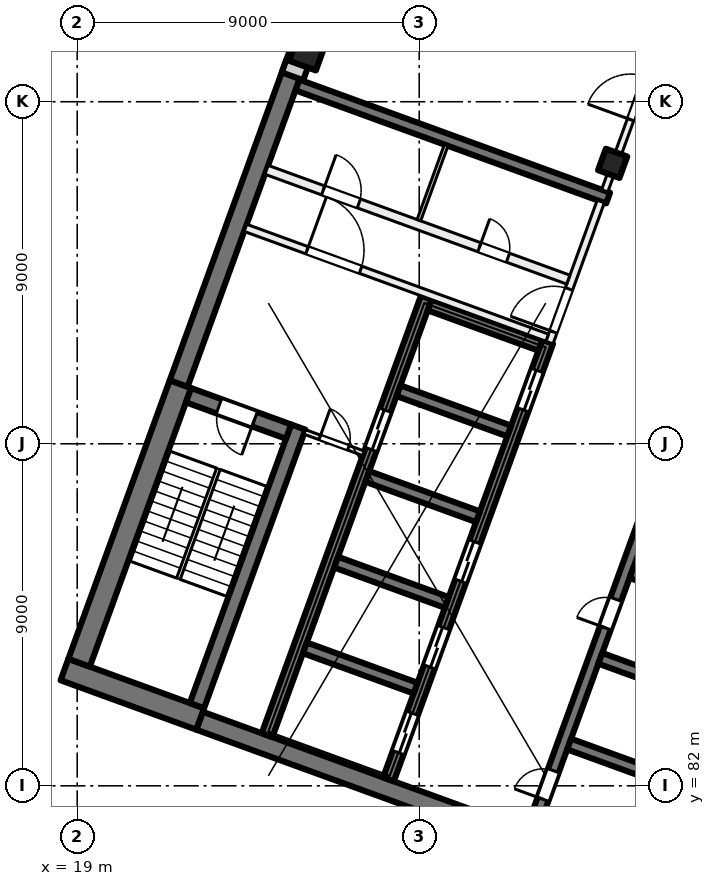
"""IFC4 building model, lengths in metres.
Left out: names, types, materials, properties, quantities, classifications, styles, units other than length and angle.
Written with IfcOpenShell. Run it as: python <this file> out.ifc"""

import sys

from ifc_helpers import new_model, si_unit, direction, frame, frame_2d, origin, origin_2d, place, context, subcontext, project, spatial, rectangle, extrude, element, fill, save


model = new_model("IFC4")
c1 = context("Model", 3, precision=1e-05, world=origin(), true_north=direction((0.0, 1.0)))
c2 = subcontext(c1, "Body", "Model", "MODEL_VIEW")
j1 = project(units=[si_unit("LENGTHUNIT", "METRE"), si_unit("PLANEANGLEUNIT", "RADIAN")], contexts=[c1])
p1 = place(None, origin())
s1 = spatial("IfcSite", under=j1, at=p1, CompositionType="ELEMENT")
p2 = place(p1, origin())
s2 = spatial("IfcBuilding", under=s1, at=p2, CompositionType="ELEMENT")
p3 = place(p2, frame((0.0, 0.0, 204.0)))
s3 = spatial("IfcBuildingStorey", under=s2, at=p3, CompositionType="ELEMENT", Elevation=204.0)
p4 = place(p3, frame((33.091, 98.379, 0.0), z_axis=(0.0, 0.0, 1.0), x_axis=(-0.342020143326, -0.939692620786, 0.0)))
e1 = element("IfcColumn", 1, at=p4, inside=s3, PredefinedType="COLUMN", context=c2, shape_type="SweptSolid", body=[
    extrude(rectangle(XDim=0.6, YDim=0.6, at=origin_2d()), origin(), (0.0, 0.0, 1.0), 4.0),
])
p5 = place(p3, frame((25.056, 101.303, 0.0), z_axis=(0.0, 0.0, 1.0), x_axis=(-0.342020143326, -0.939692620786, 0.0)))
e2 = element("IfcColumn", 2, at=p5, inside=s3, PredefinedType="COLUMN", context=c2, shape_type="SweptSolid", body=[
    extrude(rectangle(XDim=0.75, YDim=0.75, at=origin_2d()), origin(), (0.0, 0.0, 1.0), 4.0),
])
p6 = place(p3, frame((35.75, 78.788, 0.0), z_axis=(0.0, 0.0, 1.0), x_axis=(-0.939692894512, 0.342019391267, 0.0)))
e3 = element("IfcWall", 3, at=p6, inside=s3, PredefinedType="SHEAR", context=c2, shape_type="SweptSolid", body=[
    extrude(rectangle(XDim=14.4, YDim=0.5, at=frame_2d((7.2, 0.0))), origin(), (0.0, 0.0, 1.0), 4.0),
])
p7 = place(p3, frame((22.236, 83.76, 0.0), z_axis=(0.0, 0.0, 1.0), x_axis=(-0.939680822529, 0.342052557032, 0.0)))
e4 = element("IfcWall", 4, at=p7, inside=s3, PredefinedType="SHEAR", context=c2, shape_type="SweptSolid", body=[
    extrude(rectangle(XDim=3.8, YDim=0.6, at=frame_2d((1.9, 0.0))), origin(), (0.0, 0.0, 1.0), 4.0),
])
p8 = place(p3, frame((19.05, 85.239, 0.0), z_axis=(0.0, 0.0, 1.0), x_axis=(0.342016982193, 0.939693771338, 0.0)))
e5 = element("IfcWall", 5, at=p8, inside=s3, PredefinedType="SHEAR", context=c2, shape_type="SweptSolid", body=[
    extrude(rectangle(XDim=7.8, YDim=0.6, at=frame_2d((3.9, 0.0))), origin(), (0.0, 0.0, 1.0), 4.0),
])
p9 = place(p3, frame((21.67, 92.585, 0.0), z_axis=(0.0, 0.0, 1.0), x_axis=(0.342035714298, 0.93968695327, 0.0)))
e6 = element("IfcWall", 6, at=p9, inside=s3, PredefinedType="SHEAR", context=c2, shape_type="SweptSolid", body=[
    extrude(rectangle(XDim=8.975, YDim=0.5, at=frame_2d((4.488, 0.0))), origin(), (0.0, 0.0, 1.0), 4.0),
])
p10 = place(p3, frame((22.15, 84.11, 0.0), z_axis=(0.0, 0.0, 1.0), x_axis=(0.342016982193, 0.939693771338, 0.0)))
e7 = element("IfcWall", 7, at=p10, inside=s3, PredefinedType="SHEAR", context=c2, shape_type="SweptSolid", body=[
    extrude(rectangle(XDim=7.8, YDim=0.4, at=frame_2d((3.9, 0.0))), origin(), (0.0, 0.0, 1.0), 4.0),
])
p11 = place(p3, frame((24.562, 91.32, 0.0), z_axis=(0.0, 0.0, 1.0), x_axis=(-0.939717030584, 0.341953070509, 0.0)))
e8 = element("IfcWall", 8, at=p11, inside=s3, PredefinedType="SHEAR", context=c2, shape_type="SweptSolid", body=[
    extrude(rectangle(XDim=2.8, YDim=0.4, at=frame_2d((1.4, 0.0))), origin(), (0.0, 0.0, 1.0), 4.0),
])
p12 = place(p11, frame((0.95, 0.0, 0.0)))
e9 = element("IfcOpeningElement", 9, at=p12, cuts=e8, PredefinedType="OPENING", context=c2, shape_type="SweptSolid", body=[
    extrude(rectangle(XDim=1.0, YDim=2.1, at=frame_2d((0.5, 1.05))), frame((0.0, 0.21, 0.0), z_axis=(0.0, -1.0, 0.0), x_axis=(1.0, 0.0, 0.0)), (0.0, 0.0, 1.0), 0.42),
])
p13 = place(p3, frame((30.949, 80.801, 0.0), z_axis=(0.0, 0.0, 1.0), x_axis=(0.342016684409, 0.939693879721, 0.0)))
e10 = element("IfcWall", 10, at=p13, inside=s3, PredefinedType="SHEAR", context=c2, shape_type="SweptSolid", body=[
    extrude(rectangle(XDim=12.25, YDim=0.3, at=frame_2d((6.125, 0.0))), origin(), (0.0, 0.0, 1.0), 4.0),
])
p14 = place(p13, frame((0.9, 0.0, 0.0)))
e11 = element("IfcOpeningElement", 11, at=p14, cuts=e10, PredefinedType="OPENING", context=c2, shape_type="SweptSolid", body=[
    extrude(rectangle(XDim=0.8, YDim=2.1, at=frame_2d((0.4, 1.05))), frame((0.0, 0.16, 0.0), z_axis=(0.0, -1.0, 0.0), x_axis=(1.0, 0.0, 0.0)), (0.0, 0.0, 1.0), 0.32),
])
p15 = place(p13, frame((5.7, 0.0, 0.0)))
e12 = element("IfcOpeningElement", 12, at=p15, cuts=e10, PredefinedType="OPENING", context=c2, shape_type="SweptSolid", body=[
    extrude(rectangle(XDim=0.8, YDim=2.1, at=frame_2d((0.4, 1.05))), frame((0.0, 0.16, 0.0), z_axis=(0.0, -1.0, 0.0), x_axis=(1.0, 0.0, 0.0)), (0.0, 0.0, 1.0), 0.32),
])
p16 = place(p3, frame((34.858, 82.039, 0.0), z_axis=(0.0, 0.0, 1.0), x_axis=(-0.939689908313, 0.342027595692, 0.0)))
e13 = element("IfcWall", 13, at=p16, inside=s3, PredefinedType="SHEAR", context=c2, shape_type="SweptSolid", body=[
    extrude(rectangle(XDim=3.1, YDim=0.3, at=frame_2d((1.55, 0.0))), origin(), (0.0, 0.0, 1.0), 4.0),
])
p17 = place(p3, frame((35.679, 84.294, 0.0), z_axis=(0.0, 0.0, 1.0), x_axis=(-0.939706007505, 0.341983361377, 0.0)))
e14 = element("IfcWall", 14, at=p17, inside=s3, PredefinedType="SHEAR", context=c2, shape_type="SweptSolid", body=[
    extrude(rectangle(XDim=3.1, YDim=0.3, at=frame_2d((1.55, 0.0))), origin(), (0.0, 0.0, 1.0), 4.0),
])
p18 = place(p3, frame((36.5, 86.549, 0.0), z_axis=(0.0, 0.0, 1.0), x_axis=(-0.939689908313, 0.342027595692, 0.0)))
e15 = element("IfcWall", 15, at=p18, inside=s3, PredefinedType="SHEAR", context=c2, shape_type="SweptSolid", body=[
    extrude(rectangle(XDim=3.1, YDim=0.3, at=frame_2d((1.55, 0.0))), origin(), (0.0, 0.0, 1.0), 4.0),
])
p19 = place(p3, frame((27.191, 82.169, 0.0), z_axis=(0.0, 0.0, 1.0), x_axis=(0.342016684409, 0.939693879721, 0.0)))
e16 = element("IfcWall", 16, at=p19, inside=s3, PredefinedType="SHEAR", context=c2, shape_type="SweptSolid", body=[
    extrude(rectangle(XDim=12.25, YDim=0.3, at=frame_2d((6.125, 0.0))), origin(), (0.0, 0.0, 1.0), 4.0),
])
p20 = place(p19, frame((0.75, 0.0, 0.0)))
e17 = element("IfcOpeningElement", 17, at=p20, cuts=e16, PredefinedType="OPENING", context=c2, shape_type="SweptSolid", body=[
    extrude(rectangle(XDim=1.1, YDim=2.1, at=frame_2d((0.55, 1.05))), frame((0.0, 0.16, 0.0), z_axis=(0.0, -1.0, 0.0), x_axis=(1.0, 0.0, 0.0)), (0.0, 0.0, 1.0), 0.32),
])
p21 = place(p19, frame((3.15, 0.0, 0.0)))
e18 = element("IfcOpeningElement", 18, at=p21, cuts=e16, PredefinedType="OPENING", context=c2, shape_type="SweptSolid", body=[
    extrude(rectangle(XDim=1.1, YDim=2.1, at=frame_2d((0.55, 1.05))), frame((0.0, 0.16, 0.0), z_axis=(0.0, -1.0, 0.0), x_axis=(1.0, 0.0, 0.0)), (0.0, 0.0, 1.0), 0.32),
])
p22 = place(p19, frame((5.55, 0.0, 0.0)))
e19 = element("IfcOpeningElement", 19, at=p22, cuts=e16, PredefinedType="OPENING", context=c2, shape_type="SweptSolid", body=[
    extrude(rectangle(XDim=1.1, YDim=2.1, at=frame_2d((0.55, 1.05))), frame((0.0, 0.16, 0.0), z_axis=(0.0, -1.0, 0.0), x_axis=(1.0, 0.0, 0.0)), (0.0, 0.0, 1.0), 0.32),
])
p23 = place(p19, frame((10.35, 0.0, 0.0)))
e20 = element("IfcOpeningElement", 20, at=p23, cuts=e16, PredefinedType="OPENING", context=c2, shape_type="SweptSolid", body=[
    extrude(rectangle(XDim=1.1, YDim=2.1, at=frame_2d((0.55, 1.05))), frame((0.0, 0.16, 0.0), z_axis=(0.0, -1.0, 0.0), x_axis=(1.0, 0.0, 0.0)), (0.0, 0.0, 1.0), 0.32),
])
p24 = place(p3, frame((23.996, 83.332, 0.0), z_axis=(0.0, 0.0, 1.0), x_axis=(0.342016684409, 0.939693879721, 0.0)))
e21 = element("IfcWall", 21, at=p24, inside=s3, PredefinedType="SHEAR", context=c2, shape_type="SweptSolid", body=[
    extrude(rectangle(XDim=12.25, YDim=0.3, at=frame_2d((6.125, 0.0))), origin(), (0.0, 0.0, 1.0), 4.0),
])
p25 = place(p24, frame((8.0, 0.0, 0.0)))
e22 = element("IfcOpeningElement", 22, at=p25, cuts=e21, PredefinedType="OPENING", context=c2, shape_type="SweptSolid", body=[
    extrude(rectangle(XDim=1.1, YDim=2.1, at=frame_2d((0.55, 1.05))), frame((0.0, 0.16, 0.0), z_axis=(0.0, -1.0, 0.0), x_axis=(1.0, 0.0, 0.0)), (0.0, 0.0, 1.0), 0.32),
])
for number, where, z_axis, x_axis in (
    (23, (27.905, 84.57, 0.0), (0.0, 0.0, 1.0), (-0.94, 0.342, 0.0)),
    (24, (28.726, 86.825, 0.0), (0.0, 0.0, 1.0), (-0.94, 0.342, 0.0)),
    (25, (29.546, 89.08, 0.0), (0.0, 0.0, 1.0), (-0.94, 0.342, 0.0)),
):
    element("IfcWall", number, at=place(p3, frame(where, z_axis=z_axis, x_axis=x_axis)), inside=s3, PredefinedType="SHEAR", context=c2, shape_type="SweptSolid", body=[
        extrude(rectangle(XDim=3.1, YDim=0.3, at=frame_2d((1.55, 0.0))), origin(), (0.0, 0.0, 1.0), 4.0),
    ])
for number, where, z_axis, x_axis in (
    (26, (30.367, 91.336, 0.0), (0.0, 0.0, 1.0), (-0.94, 0.342, 0.0)),
    (27, (31.188, 93.591, 0.0), (0.0, 0.0, 1.0), (-0.94, 0.342, 0.0)),
):
    element("IfcWall", number, at=place(p3, frame(where, z_axis=z_axis, x_axis=x_axis)), inside=s3, PredefinedType="SHEAR", context=c2, shape_type="SweptSolid", body=[
        extrude(rectangle(XDim=3.1, YDim=0.3, at=frame_2d((1.55, 0.0))), origin(), (0.0, 0.0, 1.0), 4.0),
    ])
p26 = place(p3, frame((32.971, 97.465, 0.0), z_axis=(0.0, 0.0, 1.0), x_axis=(-0.939695066972, 0.34201342241, 0.0)))
e28 = element("IfcWall", 28, at=p26, inside=s3, PredefinedType="SHEAR", context=c2, shape_type="SweptSolid", body=[
    extrude(rectangle(XDim=8.7, YDim=0.3, at=frame_2d((4.35, 0.0))), origin(), (0.0, 0.0, 1.0), 4.0),
])
p27 = place(p3, frame((24.666, 100.669, 0.0), z_axis=(0.0, 0.0, 1.0), x_axis=(0.34201964167, 0.939692803373, 0.0)))
e29 = element("IfcWall", 29, at=p27, inside=s3, PredefinedType="SOLIDWALL", context=c2, shape_type="SweptSolid", body=[
    extrude(rectangle(XDim=32.884, YDim=0.6, at=frame_2d((16.442, 0.0))), origin(), (0.0, 0.0, 1.0), 3.625),
])
p28 = place(p27, frame((1.48, 0.0, 0.9)))
e30 = element("IfcOpeningElement", 30, at=p28, cuts=e29, PredefinedType="OPENING", context=c2, shape_type="SweptSolid", body=[
    extrude(rectangle(XDim=3.0, YDim=2.4, at=frame_2d((1.5, 1.2))), frame((0.0, 0.31, 0.0), z_axis=(0.0, -1.0, 0.0), x_axis=(1.0, 0.0, 0.0)), (0.0, 0.0, 1.0), 0.62),
])
p29 = place(p27, frame((5.98, 0.0, 0.9)))
e31 = element("IfcOpeningElement", 31, at=p29, cuts=e29, PredefinedType="OPENING", context=c2, shape_type="SweptSolid", body=[
    extrude(rectangle(XDim=3.0, YDim=2.4, at=frame_2d((1.5, 1.2))), frame((0.0, 0.31, 0.0), z_axis=(0.0, -1.0, 0.0), x_axis=(1.0, 0.0, 0.0)), (0.0, 0.0, 1.0), 0.62),
])
p30 = place(p27, frame((10.48, 0.0, 0.9)))
e32 = element("IfcOpeningElement", 32, at=p30, cuts=e29, PredefinedType="OPENING", context=c2, shape_type="SweptSolid", body=[
    extrude(rectangle(XDim=3.0, YDim=2.4, at=frame_2d((1.5, 1.2))), frame((0.0, 0.31, 0.0), z_axis=(0.0, -1.0, 0.0), x_axis=(1.0, 0.0, 0.0)), (0.0, 0.0, 1.0), 0.62),
])
p31 = place(p27, frame((15.58, 0.0, 0.0)))
e33 = element("IfcOpeningElement", 33, at=p31, cuts=e29, PredefinedType="OPENING", context=c2, shape_type="SweptSolid", body=[
    extrude(rectangle(XDim=1.8, YDim=2.4, at=frame_2d((0.9, 1.2))), frame((0.0, 0.31, 0.0), z_axis=(0.0, -1.0, 0.0), x_axis=(1.0, 0.0, 0.0)), (0.0, 0.0, 1.0), 0.62),
])
p32 = place(p27, frame((19.48, 0.0, 0.9)))
e34 = element("IfcOpeningElement", 34, at=p32, cuts=e29, PredefinedType="OPENING", context=c2, shape_type="SweptSolid", body=[
    extrude(rectangle(XDim=3.0, YDim=2.4, at=frame_2d((1.5, 1.2))), frame((0.0, 0.31, 0.0), z_axis=(0.0, -1.0, 0.0), x_axis=(1.0, 0.0, 0.0)), (0.0, 0.0, 1.0), 0.62),
])
p33 = place(p27, frame((23.98, 0.0, 0.9)))
e35 = element("IfcOpeningElement", 35, at=p33, cuts=e29, PredefinedType="OPENING", context=c2, shape_type="SweptSolid", body=[
    extrude(rectangle(XDim=3.0, YDim=2.4, at=frame_2d((1.5, 1.2))), frame((0.0, 0.31, 0.0), z_axis=(0.0, -1.0, 0.0), x_axis=(1.0, 0.0, 0.0)), (0.0, 0.0, 1.0), 0.62),
])
p34 = place(p27, frame((29.08, 0.0, 0.0)))
e36 = element("IfcOpeningElement", 36, at=p34, cuts=e29, PredefinedType="OPENING", context=c2, shape_type="SweptSolid", body=[
    extrude(rectangle(XDim=1.8, YDim=2.4, at=frame_2d((0.9, 1.2))), frame((0.0, 0.31, 0.0), z_axis=(0.0, -1.0, 0.0), x_axis=(1.0, 0.0, 0.0)), (0.0, 0.0, 1.0), 0.62),
])
p35 = place(p3, frame((31.427, 93.663, 0.0), z_axis=(0.0, 0.0, 1.0), x_axis=(0.342030870568, 0.93968871632, 0.0)))
e37 = element("IfcWall", 37, at=p35, inside=s3, PredefinedType="PARTITIONING", context=c2, shape_type="SweptSolid", body=[
    extrude(rectangle(XDim=3.95, YDim=0.2, at=frame_2d((1.975, 0.0))), origin(), (0.0, 0.0, 1.0), 3.625),
])
p36 = place(p35, frame((0.3, 0.0, 0.0)))
e38 = element("IfcOpeningElement", 38, at=p36, cuts=e37, PredefinedType="OPENING", context=c2, shape_type="SweptSolid", body=[
    extrude(rectangle(XDim=1.2, YDim=2.1, at=frame_2d((0.6, 1.05))), frame((0.0, 0.11, 0.0), z_axis=(0.0, -1.0, 0.0), x_axis=(1.0, 0.0, 0.0)), (0.0, 0.0, 1.0), 0.22),
])
p37 = place(p3, frame((23.427, 96.682, 0.0), z_axis=(0.0, 0.0, 1.0), x_axis=(0.939690465531, -0.342026064782, 0.0)))
e39 = element("IfcWall", 39, at=p37, inside=s3, PredefinedType="PARTITIONING", context=c2, shape_type="SweptSolid", body=[
    extrude(rectangle(XDim=8.45, YDim=0.2, at=frame_2d((4.225, 0.0))), origin(), (0.0, 0.0, 1.0), 3.625),
])
p38 = place(p37, frame((1.725, 0.0, 0.0)))
e40 = element("IfcOpeningElement", 40, at=p38, cuts=e39, PredefinedType="OPENING", context=c2, shape_type="SweptSolid", body=[
    extrude(rectangle(XDim=1.5, YDim=2.1, at=frame_2d((0.75, 1.05))), frame((0.0, 0.11, 0.0), z_axis=(0.0, -1.0, 0.0), x_axis=(1.0, 0.0, 0.0)), (0.0, 0.0, 1.0), 0.22),
])
p39 = place(p3, frame((23.983, 98.208, 0.0), z_axis=(0.0, 0.0, 1.0), x_axis=(0.939699751196, -0.342000552051, 0.0)))
e41 = element("IfcWall", 41, at=p39, inside=s3, PredefinedType="PARTITIONING", context=c2, shape_type="SweptSolid", body=[
    extrude(rectangle(XDim=8.45, YDim=0.25, at=frame_2d((4.225, 0.0))), origin(), (0.0, 0.0, 1.0), 3.625),
])
p40 = place(p39, frame((5.96, 0.0, 0.0)))
e42 = element("IfcOpeningElement", 42, at=p40, cuts=e41, PredefinedType="OPENING", context=c2, shape_type="SweptSolid", body=[
    extrude(rectangle(XDim=0.8, YDim=2.1, at=frame_2d((0.4, 1.05))), frame((0.0, 0.135, 0.0), z_axis=(0.0, -1.0, 0.0), x_axis=(1.0, 0.0, 0.0)), (0.0, 0.0, 1.0), 0.27),
])
p41 = place(p39, frame((1.585, 0.0, 0.0)))
e43 = element("IfcOpeningElement", 43, at=p41, cuts=e41, PredefinedType="OPENING", context=c2, shape_type="SweptSolid", body=[
    extrude(rectangle(XDim=1.0, YDim=2.1, at=frame_2d((0.5, 1.05))), frame((0.0, 0.135, 0.0), z_axis=(0.0, -1.0, 0.0), x_axis=(1.0, 0.0, 0.0)), (0.0, 0.0, 1.0), 0.27),
])
p42 = place(p3, frame((24.985, 91.312, 0.0), z_axis=(0.0, 0.0, 1.0), x_axis=(0.939719959755, -0.341945020783, 0.0)))
e44 = element("IfcWall", 44, at=p42, inside=s3, PredefinedType="PARTITIONING", context=c2, shape_type="SweptSolid", body=[
    extrude(rectangle(XDim=1.65, YDim=0.125, at=frame_2d((0.825, 0.0))), origin(), (0.0, 0.0, 1.0), 3.625),
])
p43 = place(p42, frame((0.425, 0.0, 0.0)))
e45 = element("IfcOpeningElement", 45, at=p43, cuts=e44, PredefinedType="OPENING", context=c2, shape_type="SweptSolid", body=[
    extrude(rectangle(XDim=0.8, YDim=2.1, at=frame_2d((0.4, 1.05))), frame((0.0, 0.073, 0.0), z_axis=(0.0, -1.0, 0.0), x_axis=(1.0, 0.0, 0.0)), (0.0, 0.0, 1.0), 0.145),
])
p44 = place(p3, frame((27.991, 96.883, 0.0), z_axis=(0.0, 0.0, 1.0), x_axis=(0.342023078919, 0.939691552312, 0.0)))
e46 = element("IfcWall", 46, at=p44, inside=s3, PredefinedType="PARTITIONING", context=c2, shape_type="SweptSolid", body=[
    extrude(rectangle(XDim=2.1, YDim=0.1, at=frame_2d((1.05, 0.0))), origin(), (0.0, 0.0, 1.0), 3.625),
])
p45 = place(p3, frame((26.736, 105.48, 0.0), z_axis=(0.0, 0.0, 1.0), x_axis=(0.939695108427, -0.342013308511, 0.0)))
e47 = element("IfcWall", 47, at=p45, inside=s3, PredefinedType="PARTITIONING", context=c2, shape_type="SweptSolid", body=[
    extrude(rectangle(XDim=16.9, YDim=0.175, at=frame_2d((8.45, 0.0))), origin(), (0.0, 0.0, 1.0), 3.625),
])
p46 = place(p3, frame((32.881, 97.657, 0.0), z_axis=(0.0, 0.0, 1.0), x_axis=(0.342058204353, 0.939678766832, 0.0)))
e48 = element("IfcWall", 48, at=p46, inside=s3, PredefinedType="PARTITIONING", context=c2, shape_type="SweptSolid", body=[
    extrude(rectangle(XDim=5.163, YDim=0.175, at=frame_2d((2.581, 0.0))), origin(), (0.0, 0.0, 1.0), 3.625),
])
p47 = place(p46, frame((1.991, 0.0, 0.0)))
e49 = element("IfcOpeningElement", 49, at=p47, cuts=e48, PredefinedType="OPENING", context=c2, shape_type="SweptSolid", body=[
    extrude(rectangle(XDim=1.2, YDim=2.1, at=frame_2d((0.6, 1.05))), frame((0.0, 0.097, 0.0), z_axis=(0.0, -1.0, 0.0), x_axis=(1.0, 0.0, 0.0)), (0.0, 0.0, 1.0), 0.195),
])
p48 = place(p20, origin())
e50 = element("IfcDoor", 50, at=p48, inside=s3, OperationType="DOUBLE_DOOR_SLIDING", PredefinedType="DOOR", context=c2, shape_type="SweptSolid", body=[
    extrude(rectangle(XDim=1.1, YDim=2.1, at=frame_2d((0.55, 1.05))), frame((0.0, 0.025, 0.0), z_axis=(0.0, -1.0, 0.0), x_axis=(1.0, 0.0, 0.0)), (0.0, 0.0, 1.0), 0.05),
])
fill(e17, e50)
p49 = place(p21, origin())
e51 = element("IfcDoor", 51, at=p49, inside=s3, OperationType="DOUBLE_DOOR_SLIDING", PredefinedType="DOOR", context=c2, shape_type="SweptSolid", body=[
    extrude(rectangle(XDim=1.1, YDim=2.1, at=frame_2d((0.55, 1.05))), frame((0.0, 0.025, 0.0), z_axis=(0.0, -1.0, 0.0), x_axis=(1.0, 0.0, 0.0)), (0.0, 0.0, 1.0), 0.05),
])
fill(e18, e51)
p50 = place(p22, origin())
e52 = element("IfcDoor", 52, at=p50, inside=s3, OperationType="DOUBLE_DOOR_SLIDING", PredefinedType="DOOR", context=c2, shape_type="SweptSolid", body=[
    extrude(rectangle(XDim=1.1, YDim=2.1, at=frame_2d((0.55, 1.05))), frame((0.0, 0.025, 0.0), z_axis=(0.0, -1.0, 0.0), x_axis=(1.0, 0.0, 0.0)), (0.0, 0.0, 1.0), 0.05),
])
fill(e19, e52)
p51 = place(p23, origin())
e53 = element("IfcDoor", 53, at=p51, inside=s3, OperationType="DOUBLE_DOOR_SLIDING", PredefinedType="DOOR", context=c2, shape_type="SweptSolid", body=[
    extrude(rectangle(XDim=1.1, YDim=2.1, at=frame_2d((0.55, 1.05))), frame((0.0, 0.025, 0.0), z_axis=(0.0, -1.0, 0.0), x_axis=(1.0, 0.0, 0.0)), (0.0, 0.0, 1.0), 0.05),
])
fill(e20, e53)
p52 = place(p14, origin())
e54 = element("IfcDoor", 54, at=p52, inside=s3, OperationType="SINGLE_SWING_LEFT", PredefinedType="DOOR", context=c2, shape_type="SweptSolid", body=[
    extrude(rectangle(XDim=0.8, YDim=2.1, at=frame_2d((0.4, 1.05))), frame((0.0, 0.025, 0.0), z_axis=(0.0, -1.0, 0.0), x_axis=(1.0, 0.0, 0.0)), (0.0, 0.0, 1.0), 0.05),
])
fill(e11, e54)
p53 = place(p15, origin())
e55 = element("IfcDoor", 55, at=p53, inside=s3, OperationType="SINGLE_SWING_RIGHT", PredefinedType="DOOR", context=c2, shape_type="SweptSolid", body=[
    extrude(rectangle(XDim=0.8, YDim=2.1, at=frame_2d((0.4, 1.05))), frame((0.0, 0.025, 0.0), z_axis=(0.0, -1.0, 0.0), x_axis=(1.0, 0.0, 0.0)), (0.0, 0.0, 1.0), 0.05),
])
fill(e12, e55)
p54 = place(p36, origin())
e56 = element("IfcDoor", 56, at=p54, inside=s3, OperationType="DOUBLE_DOOR_SINGLE_SWING", PredefinedType="DOOR", context=c2, shape_type="SweptSolid", body=[
    extrude(rectangle(XDim=1.2, YDim=2.1, at=frame_2d((0.6, 1.05))), frame((0.0, 0.025, 0.0), z_axis=(0.0, -1.0, 0.0), x_axis=(1.0, 0.0, 0.0)), (0.0, 0.0, 1.0), 0.05),
])
fill(e38, e56)
p55 = place(p38, origin())
e57 = element("IfcDoor", 57, at=p55, inside=s3, OperationType="DOUBLE_DOOR_SINGLE_SWING", PredefinedType="DOOR", context=c2, shape_type="SweptSolid", body=[
    extrude(rectangle(XDim=1.5, YDim=2.1, at=frame_2d((0.75, 1.05))), frame((0.0, 0.025, 0.0), z_axis=(0.0, -1.0, 0.0), x_axis=(1.0, 0.0, 0.0)), (0.0, 0.0, 1.0), 0.05),
])
fill(e40, e57)
p56 = place(p12, origin())
e58 = element("IfcDoor", 58, at=p56, inside=s3, OperationType="SINGLE_SWING_LEFT", PredefinedType="DOOR", context=c2, shape_type="SweptSolid", body=[
    extrude(rectangle(XDim=1.0, YDim=2.1, at=frame_2d((0.5, 1.05))), frame((0.0, 0.025, 0.0), z_axis=(0.0, -1.0, 0.0), x_axis=(1.0, 0.0, 0.0)), (0.0, 0.0, 1.0), 0.05),
])
fill(e9, e58)
p57 = place(p43, origin())
e59 = element("IfcDoor", 59, at=p57, inside=s3, OperationType="SINGLE_SWING_RIGHT", PredefinedType="DOOR", context=c2, shape_type="SweptSolid", body=[
    extrude(rectangle(XDim=0.8, YDim=2.1, at=frame_2d((0.4, 1.05))), frame((0.0, 0.025, 0.0), z_axis=(0.0, -1.0, 0.0), x_axis=(1.0, 0.0, 0.0)), (0.0, 0.0, 1.0), 0.05),
])
fill(e45, e59)
p58 = place(p40, origin())
e60 = element("IfcDoor", 60, at=p58, inside=s3, OperationType="SINGLE_SWING_LEFT", PredefinedType="DOOR", context=c2, shape_type="SweptSolid", body=[
    extrude(rectangle(XDim=0.8, YDim=2.1, at=frame_2d((0.4, 1.05))), frame((0.0, 0.025, 0.0), z_axis=(0.0, -1.0, 0.0), x_axis=(1.0, 0.0, 0.0)), (0.0, 0.0, 1.0), 0.05),
])
fill(e42, e60)
p59 = place(p41, origin())
e61 = element("IfcDoor", 61, at=p59, inside=s3, OperationType="SINGLE_SWING_RIGHT", PredefinedType="DOOR", context=c2, shape_type="SweptSolid", body=[
    extrude(rectangle(XDim=1.0, YDim=2.1, at=frame_2d((0.5, 1.05))), frame((0.0, 0.025, 0.0), z_axis=(0.0, -1.0, 0.0), x_axis=(1.0, 0.0, 0.0)), (0.0, 0.0, 1.0), 0.05),
])
fill(e43, e61)
p60 = place(p25, origin())
e62 = element("IfcDoor", 62, at=p60, inside=s3, OperationType="DOUBLE_DOOR_SLIDING", PredefinedType="DOOR", context=c2, shape_type="SweptSolid", body=[
    extrude(rectangle(XDim=1.1, YDim=2.1, at=frame_2d((0.55, 1.05))), frame((0.0, 0.025, 0.0), z_axis=(0.0, -1.0, 0.0), x_axis=(1.0, 0.0, 0.0)), (0.0, 0.0, 1.0), 0.05),
])
fill(e22, e62)
p61 = place(p47, origin())
e63 = element("IfcDoor", 63, at=p61, inside=s3, OperationType="DOUBLE_DOOR_SINGLE_SWING", PredefinedType="DOOR", context=c2, shape_type="SweptSolid", body=[
    extrude(rectangle(XDim=1.2, YDim=2.1, at=frame_2d((0.6, 1.05))), frame((0.0, 0.025, 0.0), z_axis=(0.0, -1.0, 0.0), x_axis=(1.0, 0.0, 0.0)), (0.0, 0.0, 1.0), 0.05),
])
fill(e49, e63)
save(model, sys.argv[1])
